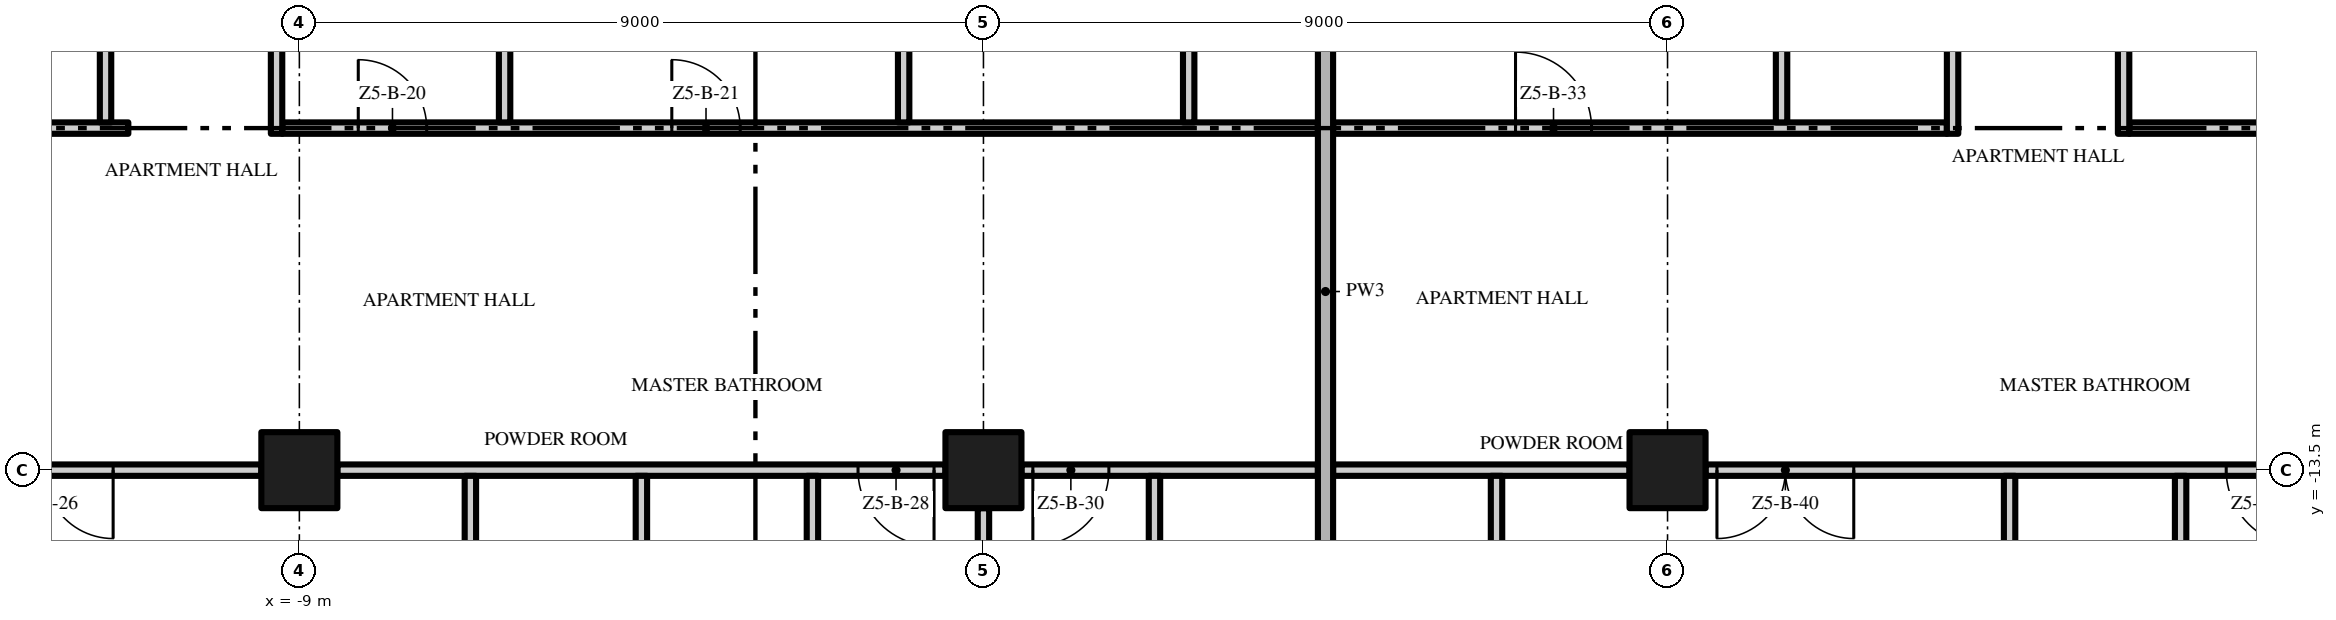
"""IFC4 building model, lengths in metres.
Left out: names, types, materials, properties, quantities, classifications, styles, units other than length and angle.
Written with IfcOpenShell. Run it as: python <this file> out.ifc"""

import sys

from ifc_helpers import new_model, si_unit, direction, frame, frame_2d, origin, origin_2d, place, context, subcontext, project, spatial, rectangle, extrude, element, fill, save


model = new_model("IFC4")
c1 = context("Model", 3, precision=1e-05, world=origin(), true_north=direction((0.0, 1.0)))
c2 = subcontext(c1, "Body", "Model", "MODEL_VIEW")
j1 = project(units=[si_unit("LENGTHUNIT", "METRE"), si_unit("PLANEANGLEUNIT", "RADIAN")], contexts=[c1])
p1 = place(None, origin())
s1 = spatial("IfcSite", under=j1, at=p1, CompositionType="ELEMENT")
p2 = place(p1, origin())
s2 = spatial("IfcBuilding", under=s1, at=p2, CompositionType="ELEMENT")
p3 = place(p2, frame((0.0, 0.0, 250.2)))
s3 = spatial("IfcBuildingStorey", under=s2, at=p3, CompositionType="ELEMENT", Elevation=250.2)
for number, where, z_axis, x_axis in (
    (1, (-9.0, -13.5, 0.0), (0.0, 0.0, 1.0), (1.0, 0.0, 0.0)),
    (2, (0.0, -13.5, 0.0), (0.0, 0.0, 1.0), (1.0, 0.0, 0.0)),
    (3, (9.0, -13.5, 0.0), (0.0, 0.0, 1.0), (1.0, 0.0, 0.0)),
):
    element("IfcColumn", number, at=place(p3, frame(where, z_axis=z_axis, x_axis=x_axis)), inside=s3, PredefinedType="COLUMN", context=c2, shape_type="SweptSolid", body=[
        extrude(rectangle(XDim=1.0, YDim=1.0, at=origin_2d()), origin(), (0.0, 0.0, 1.0), 3.5),
    ])
p4 = place(p3, frame((-9.5, -13.5, 0.0), z_axis=(0.0, 0.0, 1.0), x_axis=(-1.0, 0.0, 0.0)))
e4 = element("IfcWall", 4, at=p4, inside=s3, PredefinedType="PARTITIONING", context=c2, shape_type="SweptSolid", body=[
    extrude(rectangle(XDim=8.0, YDim=0.15, at=frame_2d((4.0, 0.0))), origin(), (0.0, 0.0, 1.0), 3.5),
])
p5 = place(p4, frame((1.95, 0.0, 0.0)))
e5 = element("IfcOpeningElement", 5, at=p5, cuts=e4, PredefinedType="OPENING", context=c2, shape_type="SweptSolid", body=[
    extrude(rectangle(XDim=1.8, YDim=2.4, at=frame_2d((0.9, 1.2))), frame((0.0, 0.085, 0.0), z_axis=(0.0, -1.0, 0.0), x_axis=(1.0, 0.0, 0.0)), (0.0, 0.0, 1.0), 0.17),
])
p6 = place(p3, frame((-0.5, -13.5, 0.0), z_axis=(0.0, 0.0, 1.0), x_axis=(-1.0, 0.0, 0.0)))
e6 = element("IfcWall", 6, at=p6, inside=s3, PredefinedType="PARTITIONING", context=c2, shape_type="SweptSolid", body=[
    extrude(rectangle(XDim=8.0, YDim=0.15, at=frame_2d((4.0, 0.0))), origin(), (0.0, 0.0, 1.0), 3.5),
])
p7 = place(p6, frame((0.15, 0.0, 0.0)))
e7 = element("IfcOpeningElement", 7, at=p7, cuts=e6, PredefinedType="OPENING", context=c2, shape_type="SweptSolid", body=[
    extrude(rectangle(XDim=1.0, YDim=2.4, at=frame_2d((0.5, 1.2))), frame((0.0, 0.085, 0.0), z_axis=(0.0, -1.0, 0.0), x_axis=(1.0, 0.0, 0.0)), (0.0, 0.0, 1.0), 0.17),
])
p8 = place(p3, frame((4.4, -13.5, 0.0), z_axis=(0.0, 0.0, 1.0), x_axis=(-1.0, 0.0, 0.0)))
e8 = element("IfcWall", 8, at=p8, inside=s3, PredefinedType="PARTITIONING", context=c2, shape_type="SweptSolid", body=[
    extrude(rectangle(XDim=3.9, YDim=0.15, at=frame_2d((1.95, 0.0))), origin(), (0.0, 0.0, 1.0), 3.5),
])
p9 = place(p8, frame((2.75, 0.0, 0.0)))
e9 = element("IfcOpeningElement", 9, at=p9, cuts=e8, PredefinedType="OPENING", context=c2, shape_type="SweptSolid", body=[
    extrude(rectangle(XDim=1.0, YDim=2.4, at=frame_2d((0.5, 1.2))), frame((0.0, 0.085, 0.0), z_axis=(0.0, -1.0, 0.0), x_axis=(1.0, 0.0, 0.0)), (0.0, 0.0, 1.0), 0.17),
])
p10 = place(p3, frame((4.6, -13.5, 0.0), z_axis=(0.0, 0.0, 1.0), x_axis=(1.0, 0.0, 0.0)))
e10 = element("IfcWall", 10, at=p10, inside=s3, PredefinedType="PARTITIONING", context=c2, shape_type="SweptSolid", body=[
    extrude(rectangle(XDim=3.9, YDim=0.15, at=frame_2d((1.95, 0.0))), origin(), (0.0, 0.0, 1.0), 3.5),
])
p11 = place(p3, frame((17.5, -13.5, 0.0), z_axis=(0.0, 0.0, 1.0), x_axis=(-1.0, 0.0, 0.0)))
e11 = element("IfcWall", 11, at=p11, inside=s3, PredefinedType="PARTITIONING", context=c2, shape_type="SweptSolid", body=[
    extrude(rectangle(XDim=8.0, YDim=0.15, at=frame_2d((4.0, 0.0))), origin(), (0.0, 0.0, 1.0), 3.5),
])
p12 = place(p11, frame((6.05, 0.0, 0.0)))
e12 = element("IfcOpeningElement", 12, at=p12, cuts=e11, PredefinedType="OPENING", context=c2, shape_type="SweptSolid", body=[
    extrude(rectangle(XDim=1.8, YDim=2.4, at=frame_2d((0.9, 1.2))), frame((0.0, 0.085, 0.0), z_axis=(0.0, -1.0, 0.0), x_axis=(1.0, 0.0, 0.0)), (0.0, 0.0, 1.0), 0.17),
])
p13 = place(p11, frame((0.15, 0.0, 0.0)))
e13 = element("IfcOpeningElement", 13, at=p13, cuts=e11, PredefinedType="OPENING", context=c2, shape_type="SweptSolid", body=[
    extrude(rectangle(XDim=1.0, YDim=2.4, at=frame_2d((0.5, 1.2))), frame((0.0, 0.085, 0.0), z_axis=(0.0, -1.0, 0.0), x_axis=(1.0, 0.0, 0.0)), (0.0, 0.0, 1.0), 0.17),
])
p14 = place(p3, frame((-26.7, -9.0, 0.0), z_axis=(0.0, 0.0, 1.0), x_axis=(1.0, 0.0, 0.0)))
e14 = element("IfcWall", 14, at=p14, inside=s3, PredefinedType="PARTITIONING", context=c2, shape_type="SweptSolid", body=[
    extrude(rectangle(XDim=15.45, YDim=0.15, at=frame_2d((7.725, 0.0))), origin(), (0.0, 0.0, 1.0), 3.5),
])
p15 = place(p14, frame((9.4, 0.0, 0.0)))
e15 = element("IfcOpeningElement", 15, at=p15, cuts=e14, PredefinedType="OPENING", context=c2, shape_type="SweptSolid", body=[
    extrude(rectangle(XDim=1.0, YDim=2.4, at=frame_2d((0.5, 1.2))), frame((0.0, 0.085, 0.0), z_axis=(0.0, -1.0, 0.0), x_axis=(1.0, 0.0, 0.0)), (0.0, 0.0, 1.0), 0.17),
])
p16 = place(p3, frame((-9.225, -9.0, 0.0), z_axis=(0.0, 0.0, 1.0), x_axis=(1.0, 0.0, 0.0)))
e16 = element("IfcWall", 16, at=p16, inside=s3, PredefinedType="PARTITIONING", context=c2, shape_type="SweptSolid", body=[
    extrude(rectangle(XDim=13.625, YDim=0.15, at=frame_2d((6.812, 0.0))), origin(), (0.0, 0.0, 1.0), 3.5),
])
p17 = place(p16, frame((1.0, 0.0, 0.0)))
e17 = element("IfcOpeningElement", 17, at=p17, cuts=e16, PredefinedType="OPENING", context=c2, shape_type="SweptSolid", body=[
    extrude(rectangle(XDim=0.9, YDim=2.1, at=frame_2d((0.45, 1.05))), frame((0.0, 0.085, 0.0), z_axis=(0.0, -1.0, 0.0), x_axis=(1.0, 0.0, 0.0)), (0.0, 0.0, 1.0), 0.17),
])
p18 = place(p16, frame((5.125, 0.0, 0.0)))
e18 = element("IfcOpeningElement", 18, at=p18, cuts=e16, PredefinedType="OPENING", context=c2, shape_type="SweptSolid", body=[
    extrude(rectangle(XDim=0.9, YDim=2.1, at=frame_2d((0.45, 1.05))), frame((0.0, 0.085, 0.0), z_axis=(0.0, -1.0, 0.0), x_axis=(1.0, 0.0, 0.0)), (0.0, 0.0, 1.0), 0.17),
])
p19 = place(p3, frame((4.6, -9.0, 0.0), z_axis=(0.0, 0.0, 1.0), x_axis=(1.0, 0.0, 0.0)))
e19 = element("IfcWall", 19, at=p19, inside=s3, PredefinedType="PARTITIONING", context=c2, shape_type="SweptSolid", body=[
    extrude(rectangle(XDim=8.075, YDim=0.15, at=frame_2d((4.037, 0.0))), origin(), (0.0, 0.0, 1.0), 3.5),
])
p20 = place(p19, frame((2.4, 0.0, 0.0)))
e20 = element("IfcOpeningElement", 20, at=p20, cuts=e19, PredefinedType="OPENING", context=c2, shape_type="SweptSolid", body=[
    extrude(rectangle(XDim=1.0, YDim=2.4, at=frame_2d((0.5, 1.2))), frame((0.0, 0.085, 0.0), z_axis=(0.0, -1.0, 0.0), x_axis=(1.0, 0.0, 0.0)), (0.0, 0.0, 1.0), 0.17),
])
p21 = place(p3, frame((15.075, -9.0, 0.0), z_axis=(0.0, 0.0, 1.0), x_axis=(1.0, 0.0, 0.0)))
e21 = element("IfcWall", 21, at=p21, inside=s3, PredefinedType="PARTITIONING", context=c2, shape_type="SweptSolid", body=[
    extrude(rectangle(XDim=11.625, YDim=0.15, at=frame_2d((5.812, 0.0))), origin(), (0.0, 0.0, 1.0), 3.5),
])
p22 = place(p21, frame((10.675, 0.0, 0.0)))
e22 = element("IfcOpeningElement", 22, at=p22, cuts=e21, PredefinedType="OPENING", context=c2, shape_type="SweptSolid", body=[
    extrude(rectangle(XDim=0.8, YDim=2.0, at=frame_2d((0.4, 1.0))), frame((0.0, 0.085, 0.0), z_axis=(0.0, -1.0, 0.0), x_axis=(1.0, 0.0, 0.0)), (0.0, 0.0, 1.0), 0.17),
])
p23 = place(p3, frame((-11.55, -8.925, 0.0), z_axis=(0.0, 0.0, 1.0), x_axis=(0.0, 1.0, 0.0)))
e23 = element("IfcWall", 23, at=p23, inside=s3, PredefinedType="PARTITIONING", context=c2, shape_type="SweptSolid", body=[
    extrude(rectangle(XDim=4.5, YDim=0.15, at=frame_2d((2.25, 0.0))), origin(), (0.0, 0.0, 1.0), 3.5),
])
p24 = place(p23, frame((1.75, 0.0, 0.0)))
e24 = element("IfcOpeningElement", 24, at=p24, cuts=e23, PredefinedType="OPENING", context=c2, shape_type="SweptSolid", body=[
    extrude(rectangle(XDim=0.9, YDim=2.1, at=frame_2d((0.45, 1.05))), frame((0.0, 0.085, 0.0), z_axis=(0.0, -1.0, 0.0), x_axis=(1.0, 0.0, 0.0)), (0.0, 0.0, 1.0), 0.17),
])
p25 = place(p3, frame((-9.3, -9.075, 0.0), z_axis=(0.0, 0.0, 1.0), x_axis=(0.0, 1.0, 0.0)))
e25 = element("IfcWall", 25, at=p25, inside=s3, PredefinedType="PARTITIONING", context=c2, shape_type="SweptSolid", body=[
    extrude(rectangle(XDim=4.075, YDim=0.15, at=frame_2d((2.038, 0.0))), origin(), (0.0, 0.0, 1.0), 3.5),
])
p26 = place(p3, frame((-6.75, -16.575, 0.0), z_axis=(0.0, 0.0, 1.0), x_axis=(0.0, 1.0, 0.0)))
e26 = element("IfcWall", 26, at=p26, inside=s3, PredefinedType="PARTITIONING", context=c2, shape_type="SweptSolid", body=[
    extrude(rectangle(XDim=3.0, YDim=0.15, at=frame_2d((1.5, 0.0))), origin(), (0.0, 0.0, 1.0), 3.5),
])
p27 = place(p3, frame((-6.3, -8.925, 0.0), z_axis=(0.0, 0.0, 1.0), x_axis=(0.0, 1.0, 0.0)))
e27 = element("IfcWall", 27, at=p27, inside=s3, PredefinedType="PARTITIONING", context=c2, shape_type="SweptSolid", body=[
    extrude(rectangle(XDim=4.35, YDim=0.15, at=frame_2d((2.175, 0.0))), origin(), (0.0, 0.0, 1.0), 3.5),
])
p28 = place(p3, frame((-4.5, -22.2, 0.0), z_axis=(0.0, 0.0, 1.0), x_axis=(0.0, 1.0, 0.0)))
e28 = element("IfcWall", 28, at=p28, inside=s3, PredefinedType="PARTITIONING", context=c2, shape_type="SweptSolid", body=[
    extrude(rectangle(XDim=8.625, YDim=0.15, at=frame_2d((4.312, 0.0))), origin(), (0.0, 0.0, 1.0), 3.5),
])
p29 = place(p3, frame((-2.25, -16.575, 0.0), z_axis=(0.0, 0.0, 1.0), x_axis=(0.0, 1.0, 0.0)))
e29 = element("IfcWall", 29, at=p29, inside=s3, PredefinedType="PARTITIONING", context=c2, shape_type="SweptSolid", body=[
    extrude(rectangle(XDim=3.0, YDim=0.15, at=frame_2d((1.5, 0.0))), origin(), (0.0, 0.0, 1.0), 3.5),
])
p30 = place(p3, frame((-1.05, -4.575, 0.0), z_axis=(0.0, 0.0, 1.0), x_axis=(0.0, -1.0, 0.0)))
e30 = element("IfcWall", 30, at=p30, inside=s3, PredefinedType="PARTITIONING", context=c2, shape_type="SweptSolid", body=[
    extrude(rectangle(XDim=4.35, YDim=0.15, at=frame_2d((2.175, 0.0))), origin(), (0.0, 0.0, 1.0), 3.5),
])
p31 = place(p30, frame((1.7, 0.0, 0.0)))
e31 = element("IfcOpeningElement", 31, at=p31, cuts=e30, PredefinedType="OPENING", context=c2, shape_type="SweptSolid", body=[
    extrude(rectangle(XDim=0.9, YDim=2.1, at=frame_2d((0.45, 1.05))), frame((0.0, 0.085, 0.0), z_axis=(0.0, -1.0, 0.0), x_axis=(1.0, 0.0, 0.0)), (0.0, 0.0, 1.0), 0.17),
])
p32 = place(p3, frame((0.0, -21.6, 0.0), z_axis=(0.0, 0.0, 1.0), x_axis=(0.0, 1.0, 0.0)))
e32 = element("IfcWall", 32, at=p32, inside=s3, PredefinedType="PARTITIONING", context=c2, shape_type="SweptSolid", body=[
    extrude(rectangle(XDim=7.6, YDim=0.15, at=frame_2d((3.8, 0.0))), origin(), (0.0, 0.0, 1.0), 3.5),
])
p33 = place(p3, frame((2.25, -16.575, 0.0), z_axis=(0.0, 0.0, 1.0), x_axis=(0.0, 1.0, 0.0)))
e33 = element("IfcWall", 33, at=p33, inside=s3, PredefinedType="PARTITIONING", context=c2, shape_type="SweptSolid", body=[
    extrude(rectangle(XDim=3.0, YDim=0.15, at=frame_2d((1.5, 0.0))), origin(), (0.0, 0.0, 1.0), 3.5),
])
p34 = place(p3, frame((2.7, -8.925, 0.0), z_axis=(0.0, 0.0, 1.0), x_axis=(0.0, 1.0, 0.0)))
e34 = element("IfcWall", 34, at=p34, inside=s3, PredefinedType="PARTITIONING", context=c2, shape_type="SweptSolid", body=[
    extrude(rectangle(XDim=4.35, YDim=0.15, at=frame_2d((2.175, 0.0))), origin(), (0.0, 0.0, 1.0), 3.5),
])
p35 = place(p3, frame((4.5, -22.2, 0.0), z_axis=(0.0, 0.0, 1.0), x_axis=(0.0, 1.0, 0.0)))
e35 = element("IfcWall", 35, at=p35, inside=s3, PredefinedType="PARTITIONING", context=c2, shape_type="SweptSolid", body=[
    extrude(rectangle(XDim=22.1, YDim=0.2, at=frame_2d((11.05, 0.0))), origin(), (0.0, 0.0, 1.0), 3.5),
])
p36 = place(p3, frame((6.75, -16.575, 0.0), z_axis=(0.0, 0.0, 1.0), x_axis=(0.0, 1.0, 0.0)))
e36 = element("IfcWall", 36, at=p36, inside=s3, PredefinedType="PARTITIONING", context=c2, shape_type="SweptSolid", body=[
    extrude(rectangle(XDim=3.0, YDim=0.15, at=frame_2d((1.5, 0.0))), origin(), (0.0, 0.0, 1.0), 3.5),
])
p37 = place(p36, frame((1.125, 0.0, 0.0)))
e37 = element("IfcOpeningElement", 37, at=p37, cuts=e36, PredefinedType="OPENING", context=c2, shape_type="SweptSolid", body=[
    extrude(rectangle(XDim=0.9, YDim=2.1, at=frame_2d((0.45, 1.05))), frame((0.0, 0.085, 0.0), z_axis=(0.0, -1.0, 0.0), x_axis=(1.0, 0.0, 0.0)), (0.0, 0.0, 1.0), 0.17),
])
p38 = place(p3, frame((10.5, -8.925, 0.0), z_axis=(0.0, 0.0, 1.0), x_axis=(0.0, 1.0, 0.0)))
e38 = element("IfcWall", 38, at=p38, inside=s3, PredefinedType="PARTITIONING", context=c2, shape_type="SweptSolid", body=[
    extrude(rectangle(XDim=4.35, YDim=0.15, at=frame_2d((2.175, 0.0))), origin(), (0.0, 0.0, 1.0), 3.5),
])
p39 = place(p3, frame((12.75, -9.075, 0.0), z_axis=(0.0, 0.0, 1.0), x_axis=(0.0, 1.0, 0.0)))
e39 = element("IfcWall", 39, at=p39, inside=s3, PredefinedType="PARTITIONING", context=c2, shape_type="SweptSolid", body=[
    extrude(rectangle(XDim=4.5, YDim=0.15, at=frame_2d((2.25, 0.0))), origin(), (0.0, 0.0, 1.0), 3.5),
])
p40 = place(p39, frame((1.875, 0.0, 0.0)))
e40 = element("IfcOpeningElement", 40, at=p40, cuts=e39, PredefinedType="OPENING", context=c2, shape_type="SweptSolid", body=[
    extrude(rectangle(XDim=0.9, YDim=2.1, at=frame_2d((0.45, 1.05))), frame((0.0, 0.085, 0.0), z_axis=(0.0, -1.0, 0.0), x_axis=(1.0, 0.0, 0.0)), (0.0, 0.0, 1.0), 0.17),
])
p41 = place(p3, frame((13.5, -22.2, 0.0), z_axis=(0.0, 0.0, 1.0), x_axis=(0.0, 1.0, 0.0)))
e41 = element("IfcWall", 41, at=p41, inside=s3, PredefinedType="PARTITIONING", context=c2, shape_type="SweptSolid", body=[
    extrude(rectangle(XDim=8.625, YDim=0.15, at=frame_2d((4.312, 0.0))), origin(), (0.0, 0.0, 1.0), 3.5),
])
p42 = place(p3, frame((15.0, -9.075, 0.0), z_axis=(0.0, 0.0, 1.0), x_axis=(0.0, 1.0, 0.0)))
e42 = element("IfcWall", 42, at=p42, inside=s3, PredefinedType="PARTITIONING", context=c2, shape_type="SweptSolid", body=[
    extrude(rectangle(XDim=4.65, YDim=0.15, at=frame_2d((2.325, 0.0))), origin(), (0.0, 0.0, 1.0), 3.5),
])
p43 = place(p3, frame((15.75, -16.575, 0.0), z_axis=(0.0, 0.0, 1.0), x_axis=(0.0, 1.0, 0.0)))
e43 = element("IfcWall", 43, at=p43, inside=s3, PredefinedType="PARTITIONING", context=c2, shape_type="SweptSolid", body=[
    extrude(rectangle(XDim=3.0, YDim=0.15, at=frame_2d((1.5, 0.0))), origin(), (0.0, 0.0, 1.0), 3.5),
])
p44 = place(p17, origin())
e44 = element("IfcDoor", 44, at=p44, inside=s3, OperationType="SINGLE_SWING_LEFT", PredefinedType="DOOR", context=c2, shape_type="SweptSolid", body=[
    extrude(rectangle(XDim=0.9, YDim=2.1, at=frame_2d((0.45, 1.05))), frame((0.0, 0.025, 0.0), z_axis=(0.0, -1.0, 0.0), x_axis=(1.0, 0.0, 0.0)), (0.0, 0.0, 1.0), 0.05),
])
fill(e17, e44)
p45 = place(p18, origin())
e45 = element("IfcDoor", 45, at=p45, inside=s3, OperationType="SINGLE_SWING_LEFT", PredefinedType="DOOR", context=c2, shape_type="SweptSolid", body=[
    extrude(rectangle(XDim=0.9, YDim=2.1, at=frame_2d((0.45, 1.05))), frame((0.0, 0.025, 0.0), z_axis=(0.0, -1.0, 0.0), x_axis=(1.0, 0.0, 0.0)), (0.0, 0.0, 1.0), 0.05),
])
fill(e18, e45)
p46 = place(p5, origin())
e46 = element("IfcDoor", 46, at=p46, inside=s3, OperationType="DOUBLE_DOOR_SINGLE_SWING", PredefinedType="DOOR", context=c2, shape_type="SweptSolid", body=[
    extrude(rectangle(XDim=1.8, YDim=2.4, at=frame_2d((0.9, 1.2))), frame((0.0, 0.025, 0.0), z_axis=(0.0, -1.0, 0.0), x_axis=(1.0, 0.0, 0.0)), (0.0, 0.0, 1.0), 0.05),
])
fill(e5, e46)
p47 = place(p7, origin())
e47 = element("IfcDoor", 47, at=p47, inside=s3, OperationType="SINGLE_SWING_LEFT", PredefinedType="DOOR", context=c2, shape_type="SweptSolid", body=[
    extrude(rectangle(XDim=1.0, YDim=2.4, at=frame_2d((0.5, 1.2))), frame((0.0, 0.025, 0.0), z_axis=(0.0, -1.0, 0.0), x_axis=(1.0, 0.0, 0.0)), (0.0, 0.0, 1.0), 0.05),
])
fill(e7, e47)
p48 = place(p9, origin())
e48 = element("IfcDoor", 48, at=p48, inside=s3, OperationType="SINGLE_SWING_RIGHT", PredefinedType="DOOR", context=c2, shape_type="SweptSolid", body=[
    extrude(rectangle(XDim=1.0, YDim=2.4, at=frame_2d((0.5, 1.2))), frame((0.0, 0.025, 0.0), z_axis=(0.0, -1.0, 0.0), x_axis=(1.0, 0.0, 0.0)), (0.0, 0.0, 1.0), 0.05),
])
fill(e9, e48)
p49 = place(p20, origin())
e49 = element("IfcDoor", 49, at=p49, inside=s3, OperationType="SINGLE_SWING_LEFT", PredefinedType="DOOR", context=c2, shape_type="SweptSolid", body=[
    extrude(rectangle(XDim=1.0, YDim=2.4, at=frame_2d((0.5, 1.2))), frame((0.0, 0.025, 0.0), z_axis=(0.0, -1.0, 0.0), x_axis=(1.0, 0.0, 0.0)), (0.0, 0.0, 1.0), 0.05),
])
fill(e20, e49)
p50 = place(p12, origin())
e50 = element("IfcDoor", 50, at=p50, inside=s3, OperationType="DOUBLE_DOOR_SINGLE_SWING", PredefinedType="DOOR", context=c2, shape_type="SweptSolid", body=[
    extrude(rectangle(XDim=1.8, YDim=2.4, at=frame_2d((0.9, 1.2))), frame((0.0, 0.025, 0.0), z_axis=(0.0, -1.0, 0.0), x_axis=(1.0, 0.0, 0.0)), (0.0, 0.0, 1.0), 0.05),
])
fill(e12, e50)
p51 = place(p13, origin())
e51 = element("IfcDoor", 51, at=p51, inside=s3, OperationType="SINGLE_SWING_LEFT", PredefinedType="DOOR", context=c2, shape_type="SweptSolid", body=[
    extrude(rectangle(XDim=1.0, YDim=2.4, at=frame_2d((0.5, 1.2))), frame((0.0, 0.025, 0.0), z_axis=(0.0, -1.0, 0.0), x_axis=(1.0, 0.0, 0.0)), (0.0, 0.0, 1.0), 0.05),
])
fill(e13, e51)
save(model, sys.argv[1])
